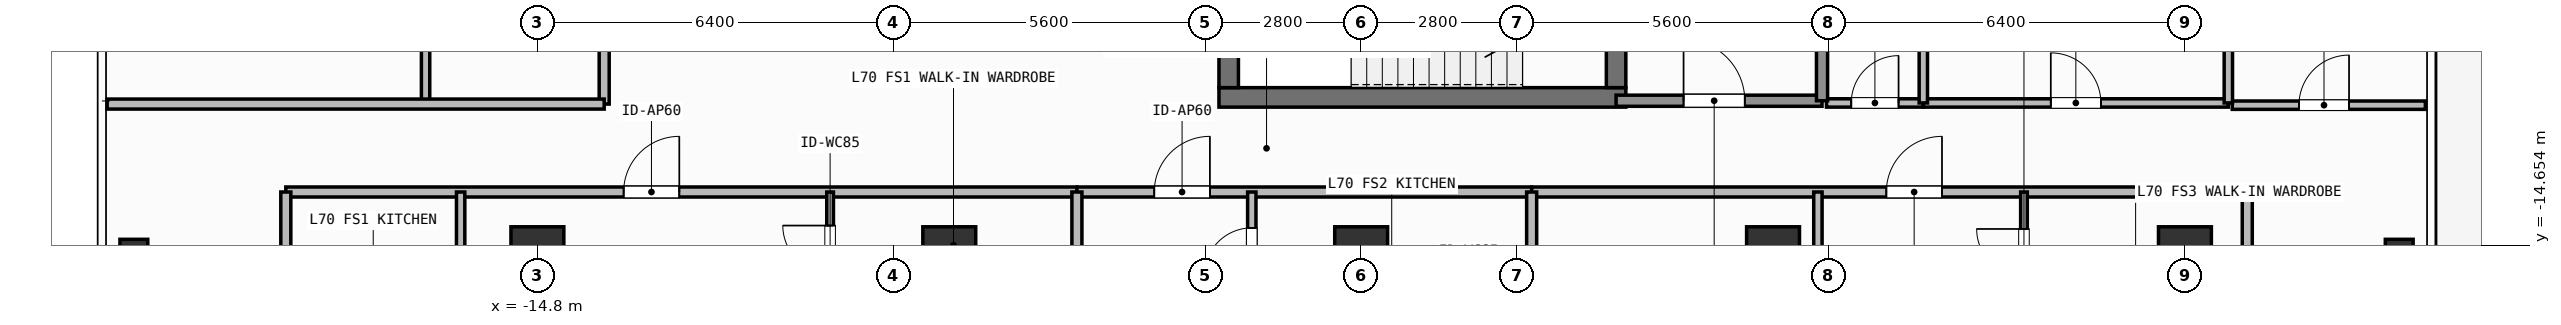
"""IFC4 building model, lengths in metres.
Left out: names, types, materials, properties, quantities, classifications, styles, units other than length and angle.
Written with IfcOpenShell. Run it as: python <this file> out.ifc"""

import sys

from ifc_helpers import new_model, si_unit, direction, frame, frame_2d, origin, origin_2d, place, context, subcontext, project, spatial, rectangle, hollow_rectangle, extrude, element, fill, save


model = new_model("IFC4")
c1 = context("Model", 3, precision=1e-05, world=origin(), true_north=direction((0.0, 1.0)))
c2 = subcontext(c1, "Body", "Model", "MODEL_VIEW")
j1 = project(units=[si_unit("LENGTHUNIT", "METRE"), si_unit("PLANEANGLEUNIT", "RADIAN")], contexts=[c1])
p1 = place(None, origin())
s1 = spatial("IfcSite", under=j1, at=p1, CompositionType="ELEMENT")
p2 = place(p1, origin())
s2 = spatial("IfcBuilding", under=s1, at=p2, CompositionType="ELEMENT")
p3 = place(p2, frame((0.0, 0.0, 285.9)))
s3 = spatial("IfcBuildingStorey", under=s2, at=p3, CompositionType="ELEMENT", Elevation=285.9)
p4 = place(p3, frame((-2.555, -12.0, 0.0), z_axis=(0.0, 0.0, 1.0), x_axis=(1.0, 0.0, 0.0)))
e1 = element("IfcWall", 1, at=p4, inside=s3, PredefinedType="SHEAR", context=c2, shape_type="SweptSolid", body=[
    extrude(rectangle(XDim=7.31, YDim=0.35, at=frame_2d((3.655, 0.0))), origin(), (0.0, 0.0, 1.0), 3.9),
])
p5 = place(p3, frame((-2.38, -11.825, 0.0), z_axis=(0.0, 0.0, 1.0), x_axis=(0.0, 1.0, 0.0)))
e2 = element("IfcWall", 2, at=p5, inside=s3, PredefinedType="SHEAR", context=c2, shape_type="SweptSolid", body=[
    extrude(rectangle(XDim=2.925, YDim=0.35, at=frame_2d((1.462, 0.0))), origin(), (0.0, 0.0, 1.0), 3.9),
])
p6 = place(p3, frame((4.58, -8.9, 0.0), z_axis=(0.0, 0.0, 1.0), x_axis=(0.0, -1.0, 0.0)))
e3 = element("IfcWall", 3, at=p6, inside=s3, PredefinedType="SHEAR", context=c2, shape_type="SweptSolid", body=[
    extrude(rectangle(XDim=2.925, YDim=0.35, at=frame_2d((1.462, 0.0))), origin(), (0.0, 0.0, 1.0), 3.9),
])
p7 = place(p6, frame((0.913, 0.0, 0.0)))
e4 = element("IfcOpeningElement", 4, at=p7, cuts=e3, PredefinedType="OPENING", context=c2, shape_type="SweptSolid", body=[
    extrude(rectangle(XDim=1.1, YDim=2.15, at=frame_2d((0.55, 1.075))), frame((0.0, 0.185, 0.0), z_axis=(0.0, -1.0, 0.0), x_axis=(1.0, 0.0, 0.0)), (0.0, 0.0, 1.0), 0.37),
])
for number, where, z_axis, x_axis in (
    (5, (-14.8, -14.8, 0.0), (0.0, 0.0, 1.0), (1.0, 0.0, 0.0)),
    (6, (-7.4, -14.8, 0.0), (0.0, 0.0, 1.0), (1.0, 0.0, 0.0)),
    (7, (0.0, -14.8, 0.0), (0.0, 0.0, 1.0), (1.0, 0.0, 0.0)),
    (8, (7.4, -14.8, 0.0), (0.0, 0.0, 1.0), (1.0, 0.0, 0.0)),
    (9, (14.8, -14.8, 0.0), (0.0, 0.0, 1.0), (1.0, 0.0, 0.0)),
):
    element("IfcColumn", number, at=place(p3, frame(where, z_axis=z_axis, x_axis=x_axis)), inside=s3, PredefinedType="COLUMN", context=c2, shape_type="SweptSolid", body=[
        extrude(rectangle(XDim=0.95, YDim=0.95, at=origin_2d()), origin(), (0.0, 0.0, 1.0), 3.9),
    ])
for number, where, z_axis, x_axis in (
    (10, (-22.05, -14.8, 0.0), (0.0, 0.0, 1.0), (1.0, 0.0, 0.0)),
    (11, (18.65, -14.8, 0.0), (0.0, 0.0, 1.0), (1.0, 0.0, 0.0)),
):
    element("IfcColumn", number, at=place(p3, frame(where, z_axis=z_axis, x_axis=x_axis)), inside=s3, PredefinedType="COLUMN", context=c2, shape_type="SweptSolid", body=[
        extrude(hollow_rectangle(XDim=0.5, YDim=0.5, WallThickness=0.025, at=origin_2d()), origin(), (0.0, 0.0, 1.0), 3.9),
    ])
p8 = place(p3, frame((4.58, -12.06, 0.0), z_axis=(0.0, 0.0, 1.0), x_axis=(1.0, 0.0, 0.0)))
e12 = element("IfcWall", 12, at=p8, inside=s3, PredefinedType="SOLIDWALL", context=c2, shape_type="SweptSolid", body=[
    extrude(rectangle(XDim=3.7, YDim=0.2, at=frame_2d((1.85, 0.0))), origin(), (0.0, 0.0, 1.0), 3.68),
])
p9 = place(p8, frame((1.212, 0.0, 0.0)))
e13 = element("IfcOpeningElement", 13, at=p9, cuts=e12, PredefinedType="OPENING", context=c2, shape_type="SweptSolid", body=[
    extrude(rectangle(XDim=1.1, YDim=2.15, at=frame_2d((0.55, 1.075))), frame((0.0, 0.11, 0.0), z_axis=(0.0, -1.0, 0.0), x_axis=(1.0, 0.0, 0.0)), (0.0, 0.0, 1.0), 0.22),
])
p10 = place(p3, frame((8.36, -12.1, 0.0), z_axis=(0.0, 0.0, 1.0), x_axis=(1.0, 0.0, 0.0)))
e14 = element("IfcWall", 14, at=p10, inside=s3, PredefinedType="PARTITIONING", context=c2, shape_type="SweptSolid", body=[
    extrude(rectangle(XDim=1.74, YDim=0.15, at=frame_2d((0.87, 0.0))), origin(), (0.0, 0.0, 1.0), 3.68),
])
p11 = place(p10, frame((0.445, 0.0, 0.0)))
e15 = element("IfcOpeningElement", 15, at=p11, cuts=e14, PredefinedType="OPENING", context=c2, shape_type="SweptSolid", body=[
    extrude(rectangle(XDim=0.85, YDim=2.1, at=frame_2d((0.425, 1.05))), frame((0.0, 0.085, 0.0), z_axis=(0.0, -1.0, 0.0), x_axis=(1.0, 0.0, 0.0)), (0.0, 0.0, 1.0), 0.17),
])
p12 = place(p3, frame((10.1, -12.1, 0.0), z_axis=(0.0, 0.0, 1.0), x_axis=(1.0, 0.0, 0.0)))
e16 = element("IfcWall", 16, at=p12, inside=s3, PredefinedType="PARTITIONING", context=c2, shape_type="SweptSolid", body=[
    extrude(rectangle(XDim=5.48, YDim=0.15, at=frame_2d((2.74, 0.0))), origin(), (0.0, 0.0, 1.0), 3.68),
])
p13 = place(p12, frame((2.29, 0.0, 0.0)))
e17 = element("IfcOpeningElement", 17, at=p13, cuts=e16, PredefinedType="OPENING", context=c2, shape_type="SweptSolid", body=[
    extrude(rectangle(XDim=0.9, YDim=2.1, at=frame_2d((0.45, 1.05))), frame((0.0, 0.085, 0.0), z_axis=(0.0, -1.0, 0.0), x_axis=(1.0, 0.0, 0.0)), (0.0, 0.0, 1.0), 0.17),
])
p14 = place(p3, frame((-19.32, -13.7, 0.0), z_axis=(0.0, 0.0, 1.0), x_axis=(1.0, 0.0, 0.0)))
e18 = element("IfcWall", 18, at=p14, inside=s3, PredefinedType="PARTITIONING", context=c2, shape_type="SweptSolid", body=[
    extrude(rectangle(XDim=14.213, YDim=0.18, at=frame_2d((7.106, 0.0))), origin(), (0.0, 0.0, 1.0), 3.68),
])
p15 = place(p14, frame((6.069, 0.0, 0.0)))
e19 = element("IfcOpeningElement", 19, at=p15, cuts=e18, PredefinedType="OPENING", context=c2, shape_type="SweptSolid", body=[
    extrude(rectangle(XDim=1.0, YDim=2.2, at=frame_2d((0.5, 1.1))), frame((0.0, 0.1, 0.0), z_axis=(0.0, -1.0, 0.0), x_axis=(1.0, 0.0, 0.0)), (0.0, 0.0, 1.0), 0.2),
])
p16 = place(p3, frame((-16.179, -17.108, 0.0), z_axis=(0.0, 0.0, 1.0), x_axis=(0.0, 1.0, 0.0)))
e20 = element("IfcWall", 20, at=p16, inside=s3, PredefinedType="PARTITIONING", context=c2, shape_type="SweptSolid", body=[
    extrude(rectangle(XDim=3.408, YDim=0.15, at=frame_2d((1.704, 0.0))), origin(), (0.0, 0.0, 1.0), 3.68),
])
p17 = place(p16, frame((0.849, 0.0, 0.0)))
e21 = element("IfcOpeningElement", 21, at=p17, cuts=e20, PredefinedType="OPENING", context=c2, shape_type="SweptSolid", body=[
    extrude(rectangle(XDim=0.85, YDim=2.1, at=frame_2d((0.425, 1.05))), frame((0.0, 0.085, 0.0), z_axis=(0.0, -1.0, 0.0), x_axis=(1.0, 0.0, 0.0)), (0.0, 0.0, 1.0), 0.17),
])
p18 = place(p3, frame((-9.541, -15.608, 0.0), z_axis=(0.0, 0.0, 1.0), x_axis=(0.0, 1.0, 0.0)))
e22 = element("IfcWall", 22, at=p18, inside=s3, PredefinedType="PARTITIONING", context=c2, shape_type="SweptSolid", body=[
    extrude(rectangle(XDim=1.908, YDim=0.12, at=frame_2d((0.954, 0.0))), origin(), (0.0, 0.0, 1.0), 3.68),
])
p19 = place(p18, frame((0.455, 0.0, 0.0)))
e23 = element("IfcOpeningElement", 23, at=p19, cuts=e22, PredefinedType="OPENING", context=c2, shape_type="SweptSolid", body=[
    extrude(rectangle(XDim=0.85, YDim=2.1, at=frame_2d((0.425, 1.05))), frame((0.0, 0.07, 0.0), z_axis=(0.0, -1.0, 0.0), x_axis=(1.0, 0.0, 0.0)), (0.0, 0.0, 1.0), 0.14),
])
p20 = place(p3, frame((-5.107, -13.7, 0.0), z_axis=(0.0, 0.0, 1.0), x_axis=(1.0, 0.0, 0.0)))
e24 = element("IfcWall", 24, at=p20, inside=s3, PredefinedType="PARTITIONING", context=c2, shape_type="SweptSolid", body=[
    extrude(rectangle(XDim=8.17, YDim=0.18, at=frame_2d((4.085, 0.0))), origin(), (0.0, 0.0, 1.0), 3.68),
])
p21 = place(p20, frame((1.389, 0.0, 0.0)))
e25 = element("IfcOpeningElement", 25, at=p21, cuts=e24, PredefinedType="OPENING", context=c2, shape_type="SweptSolid", body=[
    extrude(rectangle(XDim=1.0, YDim=2.2, at=frame_2d((0.5, 1.1))), frame((0.0, 0.1, 0.0), z_axis=(0.0, -1.0, 0.0), x_axis=(1.0, 0.0, 0.0)), (0.0, 0.0, 1.0), 0.2),
])
p22 = place(p3, frame((-1.965, -15.839, 0.0), z_axis=(0.0, 0.0, 1.0), x_axis=(0.0, 1.0, 0.0)))
e26 = element("IfcWall", 26, at=p22, inside=s3, PredefinedType="PARTITIONING", context=c2, shape_type="SweptSolid", body=[
    extrude(rectangle(XDim=2.139, YDim=0.15, at=frame_2d((1.07, 0.0))), origin(), (0.0, 0.0, 1.0), 3.68),
])
p23 = place(p22, frame((0.645, 0.0, 0.0)))
e27 = element("IfcOpeningElement", 27, at=p23, cuts=e26, PredefinedType="OPENING", context=c2, shape_type="SweptSolid", body=[
    extrude(rectangle(XDim=0.85, YDim=2.1, at=frame_2d((0.425, 1.05))), frame((0.0, 0.085, 0.0), z_axis=(0.0, -1.0, 0.0), x_axis=(1.0, 0.0, 0.0)), (0.0, 0.0, 1.0), 0.17),
])
p24 = place(p3, frame((3.063, -13.7, 0.0), z_axis=(0.0, 0.0, 1.0), x_axis=(1.0, 0.0, 0.0)))
e28 = element("IfcWall", 28, at=p24, inside=s3, PredefinedType="PARTITIONING", context=c2, shape_type="SweptSolid", body=[
    extrude(rectangle(XDim=12.857, YDim=0.18, at=frame_2d((6.428, 0.0))), origin(), (0.0, 0.0, 1.0), 3.68),
])
p25 = place(p24, frame((6.372, 0.0, 0.0)))
e29 = element("IfcOpeningElement", 29, at=p25, cuts=e28, PredefinedType="OPENING", context=c2, shape_type="SweptSolid", body=[
    extrude(rectangle(XDim=1.0, YDim=2.2, at=frame_2d((0.5, 1.1))), frame((0.0, 0.1, 0.0), z_axis=(0.0, -1.0, 0.0), x_axis=(1.0, 0.0, 0.0)), (0.0, 0.0, 1.0), 0.2),
])
p26 = place(p3, frame((8.206, -17.59, 0.0), z_axis=(0.0, 0.0, 1.0), x_axis=(0.0, 1.0, 0.0)))
e30 = element("IfcWall", 30, at=p26, inside=s3, PredefinedType="PARTITIONING", context=c2, shape_type="SweptSolid", body=[
    extrude(rectangle(XDim=3.89, YDim=0.15, at=frame_2d((1.945, 0.0))), origin(), (0.0, 0.0, 1.0), 3.68),
])
p27 = place(p26, frame((1.35, 0.0, 0.0)))
e31 = element("IfcOpeningElement", 31, at=p27, cuts=e30, PredefinedType="OPENING", context=c2, shape_type="SweptSolid", body=[
    extrude(rectangle(XDim=0.85, YDim=2.1, at=frame_2d((0.425, 1.05))), frame((0.0, 0.085, 0.0), z_axis=(0.0, -1.0, 0.0), x_axis=(1.0, 0.0, 0.0)), (0.0, 0.0, 1.0), 0.17),
])
p28 = place(p3, frame((11.908, -15.878, 0.0), z_axis=(0.0, 0.0, 1.0), x_axis=(0.0, 1.0, 0.0)))
e32 = element("IfcWall", 32, at=p28, inside=s3, PredefinedType="PARTITIONING", context=c2, shape_type="SweptSolid", body=[
    extrude(rectangle(XDim=2.178, YDim=0.12, at=frame_2d((1.089, 0.0))), origin(), (0.0, 0.0, 1.0), 3.68),
])
p29 = place(p28, frame((0.664, 0.0, 0.0)))
e33 = element("IfcOpeningElement", 33, at=p29, cuts=e32, PredefinedType="OPENING", context=c2, shape_type="SweptSolid", body=[
    extrude(rectangle(XDim=0.85, YDim=2.1, at=frame_2d((0.425, 1.05))), frame((0.0, 0.07, 0.0), z_axis=(0.0, -1.0, 0.0), x_axis=(1.0, 0.0, 0.0)), (0.0, 0.0, 1.0), 0.14),
])
p30 = place(p3, frame((-13.6, -12.12, 0.0), z_axis=(0.0, 0.0, 1.0), x_axis=(0.0, 1.0, 0.0)))
e34 = element("IfcWall", 34, at=p30, inside=s3, PredefinedType="PARTITIONING", context=c2, shape_type="SweptSolid", body=[
    extrude(rectangle(XDim=10.956, YDim=0.18, at=frame_2d((5.478, 0.0))), origin(), (0.0, 0.0, 1.0), 3.68),
])
p31 = place(p30, frame((5.335, 0.0, 0.0)))
e35 = element("IfcOpeningElement", 35, at=p31, cuts=e34, PredefinedType="OPENING", context=c2, shape_type="SweptSolid", body=[
    extrude(rectangle(XDim=1.0, YDim=2.2, at=frame_2d((0.5, 1.1))), frame((0.0, 0.1, 0.0), z_axis=(0.0, -1.0, 0.0), x_axis=(1.0, 0.0, 0.0)), (0.0, 0.0, 1.0), 0.2),
])
p32 = place(p3, frame((15.65, -12.14, 0.0), z_axis=(0.0, 0.0, 1.0), x_axis=(1.0, 0.0, 0.0)))
e36 = element("IfcWall", 36, at=p32, inside=s3, PredefinedType="PARTITIONING", context=c2, shape_type="SweptSolid", body=[
    extrude(rectangle(XDim=3.47, YDim=0.15, at=frame_2d((1.735, 0.0))), origin(), (0.0, 0.0, 1.0), 3.68),
])
p33 = place(p32, frame((1.198, 0.0, 0.0)))
e37 = element("IfcOpeningElement", 37, at=p33, cuts=e36, PredefinedType="OPENING", context=c2, shape_type="SweptSolid", body=[
    extrude(rectangle(XDim=0.9, YDim=2.1, at=frame_2d((0.45, 1.05))), frame((0.0, 0.085, 0.0), z_axis=(0.0, -1.0, 0.0), x_axis=(1.0, 0.0, 0.0)), (0.0, 0.0, 1.0), 0.17),
])
p34 = place(p3, frame((8.28, -12.06, 0.0), z_axis=(0.0, 0.0, 1.0), x_axis=(0.0, 1.0, 0.0)))
e38 = element("IfcWall", 38, at=p34, inside=s3, PredefinedType="SOLIDWALL", context=c2, shape_type="SweptSolid", body=[
    extrude(rectangle(XDim=3.335, YDim=0.2, at=frame_2d((1.667, 0.0))), origin(), (0.0, 0.0, 1.0), 3.68),
])
p35 = place(p3, frame((10.1, -12.1, 0.0), z_axis=(0.0, 0.0, 1.0), x_axis=(0.0, 1.0, 0.0)))
e39 = element("IfcWall", 39, at=p35, inside=s3, PredefinedType="PARTITIONING", context=c2, shape_type="SweptSolid", body=[
    extrude(rectangle(XDim=2.35, YDim=0.15, at=frame_2d((1.175, 0.0))), origin(), (0.0, 0.0, 1.0), 3.68),
])
p36 = place(p3, frame((15.58, -12.1, 0.0), z_axis=(0.0, 0.0, 1.0), x_axis=(0.0, 1.0, 0.0)))
e40 = element("IfcWall", 40, at=p36, inside=s3, PredefinedType="PARTITIONING", context=c2, shape_type="SweptSolid", body=[
    extrude(rectangle(XDim=6.25, YDim=0.15, at=frame_2d((3.125, 0.0))), origin(), (0.0, 0.0, 1.0), 3.68),
])
for number, where, z_axis, x_axis in (
    (41, (-19.32, -19.51, 0.0), (0.0, 0.0, 1.0), (0.0, 1.0, 0.0)),
    (42, (15.92, -19.51, 0.0), (0.0, 0.0, 1.0), (0.0, 1.0, 0.0)),
):
    element("IfcWall", number, at=place(p3, frame(where, z_axis=z_axis, x_axis=x_axis)), inside=s3, PredefinedType="PARTITIONING", context=c2, shape_type="SweptSolid", body=[
        extrude(rectangle(XDim=5.81, YDim=0.18, at=frame_2d((2.905, 0.0))), origin(), (0.0, 0.0, 1.0), 3.68),
    ])
for number, where, z_axis, x_axis in (
    (43, (-5.107, -20.63, 0.0), (0.0, 0.0, 1.0), (0.0, 1.0, 0.0)),
    (44, (3.063, -20.63, 0.0), (0.0, 0.0, 1.0), (0.0, 1.0, 0.0)),
):
    element("IfcWall", number, at=place(p3, frame(where, z_axis=z_axis, x_axis=x_axis)), inside=s3, PredefinedType="PARTITIONING", context=c2, shape_type="SweptSolid", body=[
        extrude(rectangle(XDim=6.93, YDim=0.18, at=frame_2d((3.465, 0.0))), origin(), (0.0, 0.0, 1.0), 3.68),
    ])
p37 = place(p3, frame((-16.809, -12.12, 0.0), z_axis=(0.0, 0.0, 1.0), x_axis=(0.0, 1.0, 0.0)))
e45 = element("IfcWall", 45, at=p37, inside=s3, PredefinedType="PARTITIONING", context=c2, shape_type="SweptSolid", body=[
    extrude(rectangle(XDim=2.8, YDim=0.15, at=frame_2d((1.4, 0.0))), origin(), (0.0, 0.0, 1.0), 3.68),
])
p38 = place(p3, frame((-22.53, -12.12, 0.0), z_axis=(0.0, 0.0, 1.0), x_axis=(1.0, 0.0, 0.0)))
e46 = element("IfcWall", 46, at=p38, inside=s3, PredefinedType="PARTITIONING", context=c2, shape_type="SweptSolid", body=[
    extrude(rectangle(XDim=8.93, YDim=0.18, at=frame_2d((4.465, 0.0))), origin(), (0.0, 0.0, 1.0), 3.68),
])
p39 = place(p9, origin())
e47 = element("IfcDoor", 47, at=p39, inside=s3, OperationType="SINGLE_SWING_LEFT", PredefinedType="DOOR", context=c2, shape_type="SweptSolid", body=[
    extrude(rectangle(XDim=1.1, YDim=2.15, at=frame_2d((0.55, 1.075))), frame((0.0, 0.025, 0.0), z_axis=(0.0, -1.0, 0.0), x_axis=(1.0, 0.0, 0.0)), (0.0, 0.0, 1.0), 0.05),
])
fill(e13, e47)
p40 = place(p11, origin())
e48 = element("IfcDoor", 48, at=p40, inside=s3, OperationType="SINGLE_SWING_RIGHT", PredefinedType="DOOR", context=c2, shape_type="SweptSolid", body=[
    extrude(rectangle(XDim=0.85, YDim=2.1, at=frame_2d((0.425, 1.05))), frame((0.0, 0.025, 0.0), z_axis=(0.0, -1.0, 0.0), x_axis=(1.0, 0.0, 0.0)), (0.0, 0.0, 1.0), 0.05),
])
fill(e15, e48)
p41 = place(p13, origin())
e49 = element("IfcDoor", 49, at=p41, inside=s3, OperationType="SINGLE_SWING_LEFT", PredefinedType="DOOR", context=c2, shape_type="SweptSolid", body=[
    extrude(rectangle(XDim=0.9, YDim=2.1, at=frame_2d((0.45, 1.05))), frame((0.0, 0.025, 0.0), z_axis=(0.0, -1.0, 0.0), x_axis=(1.0, 0.0, 0.0)), (0.0, 0.0, 1.0), 0.05),
])
fill(e17, e49)
p42 = place(p15, origin())
e50 = element("IfcDoor", 50, at=p42, inside=s3, OperationType="SINGLE_SWING_RIGHT", PredefinedType="DOOR", context=c2, shape_type="SweptSolid", body=[
    extrude(rectangle(XDim=1.0, YDim=2.2, at=frame_2d((0.5, 1.1))), frame((0.0, 0.025, 0.0), z_axis=(0.0, -1.0, 0.0), x_axis=(1.0, 0.0, 0.0)), (0.0, 0.0, 1.0), 0.05),
])
fill(e19, e50)
p43 = place(p19, origin())
e51 = element("IfcDoor", 51, at=p43, inside=s3, OperationType="SINGLE_SWING_RIGHT", PredefinedType="DOOR", context=c2, shape_type="SweptSolid", body=[
    extrude(rectangle(XDim=0.85, YDim=2.1, at=frame_2d((0.425, 1.05))), frame((0.0, 0.025, 0.0), z_axis=(0.0, -1.0, 0.0), x_axis=(1.0, 0.0, 0.0)), (0.0, 0.0, 1.0), 0.05),
])
fill(e23, e51)
p44 = place(p21, origin())
e52 = element("IfcDoor", 52, at=p44, inside=s3, OperationType="SINGLE_SWING_RIGHT", PredefinedType="DOOR", context=c2, shape_type="SweptSolid", body=[
    extrude(rectangle(XDim=1.0, YDim=2.2, at=frame_2d((0.5, 1.1))), frame((0.0, 0.025, 0.0), z_axis=(0.0, -1.0, 0.0), x_axis=(1.0, 0.0, 0.0)), (0.0, 0.0, 1.0), 0.05),
])
fill(e25, e52)
p45 = place(p23, origin())
e53 = element("IfcDoor", 53, at=p45, inside=s3, OperationType="SINGLE_SWING_LEFT", PredefinedType="DOOR", context=c2, shape_type="SweptSolid", body=[
    extrude(rectangle(XDim=0.85, YDim=2.1, at=frame_2d((0.425, 1.05))), frame((0.0, 0.025, 0.0), z_axis=(0.0, -1.0, 0.0), x_axis=(1.0, 0.0, 0.0)), (0.0, 0.0, 1.0), 0.05),
])
fill(e27, e53)
p46 = place(p25, origin())
e54 = element("IfcDoor", 54, at=p46, inside=s3, OperationType="SINGLE_SWING_RIGHT", PredefinedType="DOOR", context=c2, shape_type="SweptSolid", body=[
    extrude(rectangle(XDim=1.0, YDim=2.2, at=frame_2d((0.5, 1.1))), frame((0.0, 0.025, 0.0), z_axis=(0.0, -1.0, 0.0), x_axis=(1.0, 0.0, 0.0)), (0.0, 0.0, 1.0), 0.05),
])
fill(e29, e54)
p47 = place(p29, origin())
e55 = element("IfcDoor", 55, at=p47, inside=s3, OperationType="SINGLE_SWING_RIGHT", PredefinedType="DOOR", context=c2, shape_type="SweptSolid", body=[
    extrude(rectangle(XDim=0.85, YDim=2.1, at=frame_2d((0.425, 1.05))), frame((0.0, 0.025, 0.0), z_axis=(0.0, -1.0, 0.0), x_axis=(1.0, 0.0, 0.0)), (0.0, 0.0, 1.0), 0.05),
])
fill(e33, e55)
p48 = place(p33, origin())
e56 = element("IfcDoor", 56, at=p48, inside=s3, OperationType="SINGLE_SWING_RIGHT", PredefinedType="DOOR", context=c2, shape_type="SweptSolid", body=[
    extrude(rectangle(XDim=0.9, YDim=2.1, at=frame_2d((0.45, 1.05))), frame((0.0, 0.025, 0.0), z_axis=(0.0, -1.0, 0.0), x_axis=(1.0, 0.0, 0.0)), (0.0, 0.0, 1.0), 0.05),
])
fill(e37, e56)
save(model, sys.argv[1])
